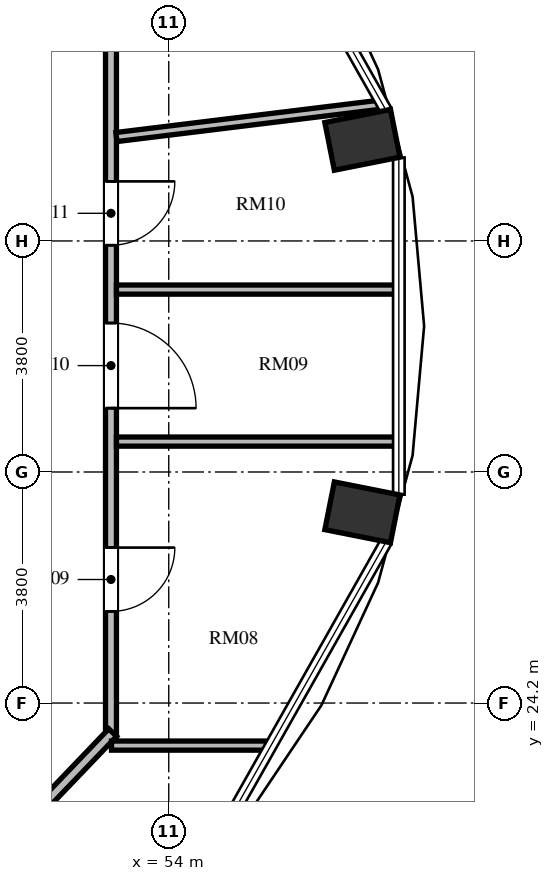
"""IFC4 building model, lengths in metres.
Left out: names, types, materials, properties, quantities, classifications, styles, units other than length and angle.
Written with IfcOpenShell. Run it as: python <this file> out.ifc"""

import sys

from ifc_helpers import new_model, si_unit, direction, frame, frame_2d, origin, origin_2d, place, context, subcontext, project, spatial, rectangle, extrude, element, fill, save


model = new_model("IFC4")
c1 = context("Model", 3, precision=1e-05, world=origin(), true_north=direction((0.0, 1.0)))
c2 = subcontext(c1, "Body", "Model", "MODEL_VIEW")
j1 = project(units=[si_unit("LENGTHUNIT", "METRE"), si_unit("PLANEANGLEUNIT", "RADIAN")], contexts=[c1])
p1 = place(None, origin())
s1 = spatial("IfcSite", under=j1, at=p1, CompositionType="ELEMENT")
p2 = place(p1, origin())
s2 = spatial("IfcBuilding", under=s1, at=p2, CompositionType="ELEMENT")
p3 = place(p2, frame((0.0, 0.0, 216.72)))
s3 = spatial("IfcBuildingStorey", under=s2, at=p3, CompositionType="ELEMENT", Elevation=216.72)
for number, where, z_axis, x_axis in (
    (1, (57.185, 27.337, 0.0), (0.0, 0.0, 1.0), (0.981, -0.195, 0.0)),
    (2, (57.185, 33.463, 0.0), (0.0, 0.0, 1.0), (0.981, 0.195, 0.0)),
):
    element("IfcColumn", number, at=place(p3, frame(where, z_axis=z_axis, x_axis=x_axis)), inside=s3, PredefinedType="COLUMN", context=c2, shape_type="SweptSolid", body=[
        extrude(rectangle(XDim=1.1, YDim=0.8, at=origin_2d()), origin(), (0.0, 0.0, 1.0), 3.648),
    ])
p4 = place(p3, frame((53.05, 37.155, 0.0), z_axis=(0.0, 0.0, 1.0), x_axis=(0.0, -1.0, 0.0)))
e3 = element("IfcWall", 3, at=p4, inside=s3, PredefinedType="PARTITIONING", context=c2, shape_type="SweptSolid", body=[
    extrude(rectangle(XDim=13.509, YDim=0.18, at=frame_2d((6.754, 0.0))), origin(), (0.0, 0.0, 1.0), 3.448),
])
p5 = place(p4, frame((10.398, 0.0, 0.0)))
e4 = element("IfcOpeningElement", 4, at=p5, cuts=e3, PredefinedType="OPENING", context=c2, shape_type="SweptSolid", body=[
    extrude(rectangle(XDim=1.05, YDim=2.15, at=frame_2d((0.525, 1.075))), frame((0.0, 0.1, 0.0), z_axis=(0.0, -1.0, 0.0), x_axis=(1.0, 0.0, 0.0)), (0.0, 0.0, 1.0), 0.2),
])
p6 = place(p4, frame((6.705, 0.0, 0.0)))
e5 = element("IfcOpeningElement", 5, at=p6, cuts=e3, PredefinedType="OPENING", context=c2, shape_type="SweptSolid", body=[
    extrude(rectangle(XDim=1.4, YDim=2.2, at=frame_2d((0.7, 1.1))), frame((0.0, 0.1, 0.0), z_axis=(0.0, -1.0, 0.0), x_axis=(1.0, 0.0, 0.0)), (0.0, 0.0, 1.0), 0.2),
])
p7 = place(p4, frame((4.375, 0.0, 0.0)))
e6 = element("IfcOpeningElement", 6, at=p7, cuts=e3, PredefinedType="OPENING", context=c2, shape_type="SweptSolid", body=[
    extrude(rectangle(XDim=1.05, YDim=2.15, at=frame_2d((0.525, 1.075))), frame((0.0, 0.1, 0.0), z_axis=(0.0, -1.0, 0.0), x_axis=(1.0, 0.0, 0.0)), (0.0, 0.0, 1.0), 0.2),
])
p8 = place(p3, frame((53.078, 23.714, 0.0), z_axis=(0.0, 0.0, 1.0), x_axis=(-0.691353379446, -0.722516785085, 0.0)))
e7 = element("IfcWall", 7, at=p8, inside=s3, PredefinedType="PARTITIONING", context=c2, shape_type="SweptSolid", body=[
    extrude(rectangle(XDim=3.604, YDim=0.18, at=frame_2d((1.802, 0.0))), origin(), (0.0, 0.0, 1.0), 3.448),
])
p9 = place(p3, frame((53.059, 23.5, 0.0), z_axis=(0.0, 0.0, 1.0), x_axis=(1.0, 0.0, 0.0)))
e8 = element("IfcWall", 8, at=p9, inside=s3, PredefinedType="PARTITIONING", context=c2, shape_type="SweptSolid", body=[
    extrude(rectangle(XDim=2.612, YDim=0.15, at=frame_2d((1.306, 0.0))), origin(), (0.0, 0.0, 1.0), 3.448),
])
for number, where, z_axis, x_axis in (
    (9, (53.14, 28.5, 0.0), (0.0, 0.0, 1.0), (1.0, 0.0, 0.0)),
    (10, (53.14, 31.0, 0.0), (0.0, 0.0, 1.0), (1.0, 0.0, 0.0)),
):
    element("IfcWall", number, at=place(p3, frame(where, z_axis=z_axis, x_axis=x_axis)), inside=s3, PredefinedType="PARTITIONING", context=c2, shape_type="SweptSolid", body=[
        extrude(rectangle(XDim=4.632, YDim=0.15, at=frame_2d((2.316, 0.0))), origin(), (0.0, 0.0, 1.0), 3.448),
    ])
p10 = place(p3, frame((53.139, 33.509, 0.0), z_axis=(0.0, 0.0, 1.0), x_axis=(0.992571001818, 0.121666784083, 0.0)))
e11 = element("IfcWall", 11, at=p10, inside=s3, PredefinedType="PARTITIONING", context=c2, shape_type="SweptSolid", body=[
    extrude(rectangle(XDim=4.417, YDim=0.15, at=frame_2d((2.208, 0.0))), origin(), (0.0, 0.0, 1.0), 3.448),
])
p11 = place(p5, origin())
e12 = element("IfcDoor", 12, at=p11, inside=s3, OperationType="SINGLE_SWING_LEFT", PredefinedType="DOOR", context=c2, shape_type="SweptSolid", body=[
    extrude(rectangle(XDim=1.05, YDim=2.15, at=frame_2d((0.525, 1.075))), frame((0.0, 0.025, 0.0), z_axis=(0.0, -1.0, 0.0), x_axis=(1.0, 0.0, 0.0)), (0.0, 0.0, 1.0), 0.05),
])
fill(e4, e12)
p12 = place(p6, origin())
e13 = element("IfcDoor", 13, at=p12, inside=s3, OperationType="SINGLE_SWING_RIGHT", PredefinedType="DOOR", context=c2, shape_type="SweptSolid", body=[
    extrude(rectangle(XDim=1.4, YDim=2.2, at=frame_2d((0.7, 1.1))), frame((0.0, 0.025, 0.0), z_axis=(0.0, -1.0, 0.0), x_axis=(1.0, 0.0, 0.0)), (0.0, 0.0, 1.0), 0.05),
])
fill(e5, e13)
p13 = place(p7, origin())
e14 = element("IfcDoor", 14, at=p13, inside=s3, OperationType="SINGLE_SWING_LEFT", PredefinedType="DOOR", context=c2, shape_type="SweptSolid", body=[
    extrude(rectangle(XDim=1.05, YDim=2.15, at=frame_2d((0.525, 1.075))), frame((0.0, 0.025, 0.0), z_axis=(0.0, -1.0, 0.0), x_axis=(1.0, 0.0, 0.0)), (0.0, 0.0, 1.0), 0.05),
])
fill(e6, e14)
save(model, sys.argv[1])
